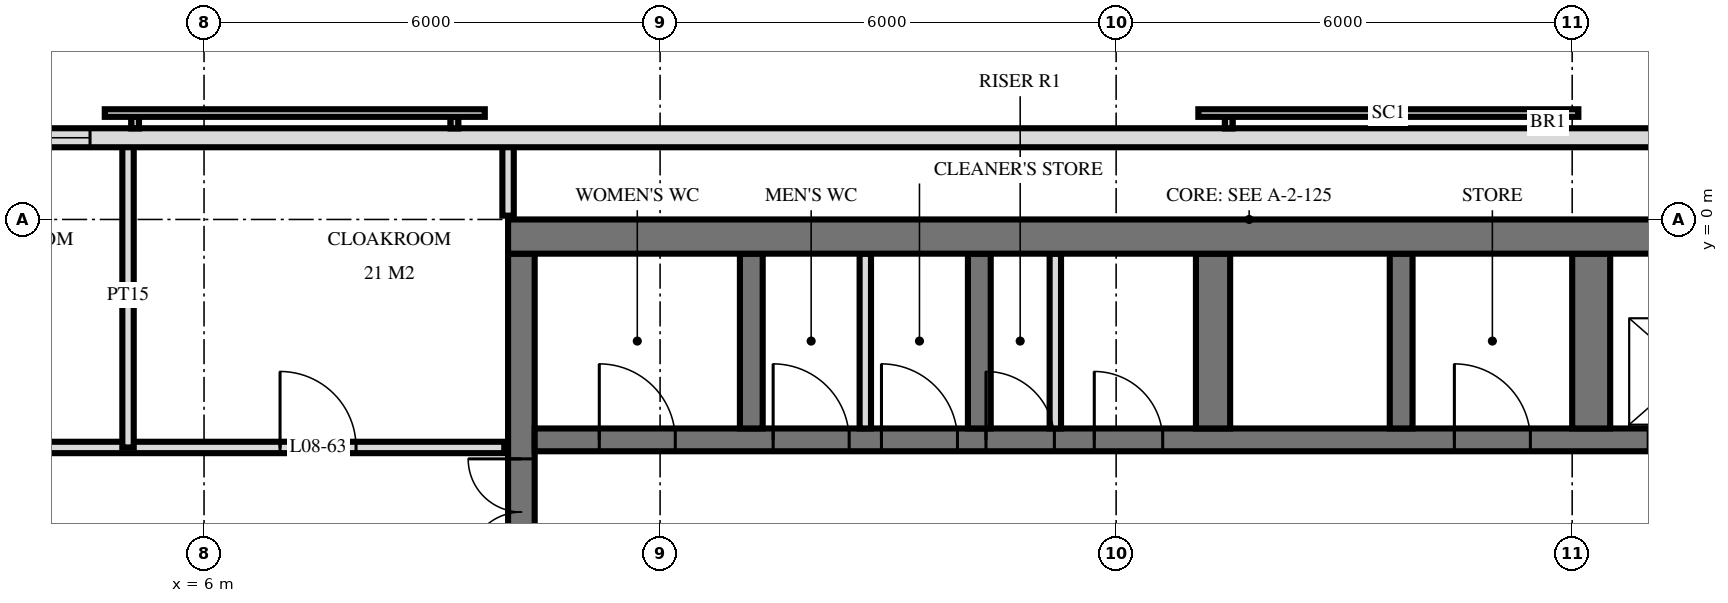
"""IFC4 building model, lengths in metres.
Left out: names, types, materials, properties, quantities, classifications, styles, units other than length and angle.
Written with IfcOpenShell. Run it as: python <this file> out.ifc"""

import sys

from ifc_helpers import new_model, si_unit, direction, frame, frame_2d, origin, place, context, subcontext, project, spatial, rectangle, extrude, element, fill, save


model = new_model("IFC4")
c1 = context("Model", 3, precision=1e-05, world=origin(), true_north=direction((0.0, 1.0)))
c2 = subcontext(c1, "Body", "Model", "MODEL_VIEW")
j1 = project(units=[si_unit("LENGTHUNIT", "METRE"), si_unit("PLANEANGLEUNIT", "RADIAN")], contexts=[c1])
p1 = place(None, origin())
s1 = spatial("IfcSite", under=j1, at=p1, CompositionType="ELEMENT")
p2 = place(p1, origin())
s2 = spatial("IfcBuilding", under=s1, at=p2, CompositionType="ELEMENT")
p3 = place(p2, frame((0.0, 0.0, 38.4)))
s3 = spatial("IfcBuildingStorey", under=s2, at=p3, CompositionType="ELEMENT", Elevation=38.4)
p4 = place(p3, frame((10.0, -0.225, 0.0), z_axis=(0.0, 0.0, 1.0), x_axis=(1.0, 0.0, 0.0)))
e1 = element("IfcWall", 1, at=p4, inside=s3, PredefinedType="SHEAR", context=c2, shape_type="SweptSolid", body=[
    extrude(rectangle(XDim=19.5, YDim=0.45, at=frame_2d((9.75, 0.0))), origin(), (0.0, 0.0, 1.0), 3.6),
])
p5 = place(p3, frame((10.175, -14.55, 0.0), z_axis=(0.0, 0.0, 1.0), x_axis=(0.0, 1.0, 0.0)))
e2 = element("IfcWall", 2, at=p5, inside=s3, PredefinedType="SHEAR", context=c2, shape_type="SweptSolid", body=[
    extrude(rectangle(XDim=14.1, YDim=0.35, at=frame_2d((7.05, 0.0))), origin(), (0.0, 0.0, 1.0), 3.6),
])
p6 = place(p5, frame((8.4, 0.0, 0.0)))
e3 = element("IfcOpeningElement", 3, at=p6, cuts=e2, PredefinedType="OPENING", context=c2, shape_type="SweptSolid", body=[
    extrude(rectangle(XDim=1.4, YDim=2.4, at=frame_2d((0.7, 1.2))), frame((0.0, 0.185, 0.0), z_axis=(0.0, -1.0, 0.0), x_axis=(1.0, 0.0, 0.0)), (0.0, 0.0, 1.0), 0.37),
])
p7 = place(p5, frame((10.0, 0.0, 0.0)))
e4 = element("IfcOpeningElement", 4, at=p7, cuts=e2, PredefinedType="OPENING", context=c2, shape_type="SweptSolid", body=[
    extrude(rectangle(XDim=1.4, YDim=2.4, at=frame_2d((0.7, 1.2))), frame((0.0, 0.185, 0.0), z_axis=(0.0, -1.0, 0.0), x_axis=(1.0, 0.0, 0.0)), (0.0, 0.0, 1.0), 0.37),
])
p8 = place(p5, frame((4.0, 0.0, 0.0)))
e5 = element("IfcOpeningElement", 5, at=p8, cuts=e2, PredefinedType="OPENING", context=c2, shape_type="SweptSolid", body=[
    extrude(rectangle(XDim=1.2, YDim=2.1, at=frame_2d((0.6, 1.05))), frame((0.0, 0.185, 0.0), z_axis=(0.0, -1.0, 0.0), x_axis=(1.0, 0.0, 0.0)), (0.0, 0.0, 1.0), 0.37),
])
p9 = place(p3, frame((10.35, -2.9, 0.0), z_axis=(0.0, 0.0, 1.0), x_axis=(1.0, 0.0, 0.0)))
e6 = element("IfcWall", 6, at=p9, inside=s3, PredefinedType="SHEAR", context=c2, shape_type="SweptSolid", body=[
    extrude(rectangle(XDim=18.7, YDim=0.3, at=frame_2d((9.35, 0.0))), origin(), (0.0, 0.0, 1.0), 3.6),
])
p10 = place(p9, frame((14.65, 0.0, 0.0)))
e7 = element("IfcOpeningElement", 7, at=p10, cuts=e6, PredefinedType="OPENING", context=c2, shape_type="SweptSolid", body=[
    extrude(rectangle(XDim=1.1, YDim=2.1, at=frame_2d((0.55, 1.05))), frame((0.0, 0.16, 0.0), z_axis=(0.0, -1.0, 0.0), x_axis=(1.0, 0.0, 0.0)), (0.0, 0.0, 1.0), 0.32),
])
p11 = place(p9, frame((17.05, 0.0, 0.0)))
e8 = element("IfcOpeningElement", 8, at=p11, cuts=e6, PredefinedType="OPENING", context=c2, shape_type="SweptSolid", body=[
    extrude(rectangle(XDim=1.1, YDim=2.1, at=frame_2d((0.55, 1.05))), frame((0.0, 0.16, 0.0), z_axis=(0.0, -1.0, 0.0), x_axis=(1.0, 0.0, 0.0)), (0.0, 0.0, 1.0), 0.32),
])
p12 = place(p9, frame((5.938, 0.0, 0.0)))
e9 = element("IfcOpeningElement", 9, at=p12, cuts=e6, PredefinedType="OPENING", context=c2, shape_type="SweptSolid", body=[
    extrude(rectangle(XDim=0.9, YDim=2.1, at=frame_2d((0.45, 1.05))), frame((0.0, 0.16, 0.0), z_axis=(0.0, -1.0, 0.0), x_axis=(1.0, 0.0, 0.0)), (0.0, 0.0, 1.0), 0.32),
])
p13 = place(p9, frame((7.363, 0.0, 0.0)))
e10 = element("IfcOpeningElement", 10, at=p13, cuts=e6, PredefinedType="OPENING", context=c2, shape_type="SweptSolid", body=[
    extrude(rectangle(XDim=0.9, YDim=2.1, at=frame_2d((0.45, 1.05))), frame((0.0, 0.16, 0.0), z_axis=(0.0, -1.0, 0.0), x_axis=(1.0, 0.0, 0.0)), (0.0, 0.0, 1.0), 0.32),
])
p14 = place(p9, frame((0.85, 0.0, 0.0)))
e11 = element("IfcOpeningElement", 11, at=p14, cuts=e6, PredefinedType="OPENING", context=c2, shape_type="SweptSolid", body=[
    extrude(rectangle(XDim=1.0, YDim=2.1, at=frame_2d((0.5, 1.05))), frame((0.0, 0.16, 0.0), z_axis=(0.0, -1.0, 0.0), x_axis=(1.0, 0.0, 0.0)), (0.0, 0.0, 1.0), 0.32),
])
p15 = place(p9, frame((3.137, 0.0, 0.0)))
e12 = element("IfcOpeningElement", 12, at=p15, cuts=e6, PredefinedType="OPENING", context=c2, shape_type="SweptSolid", body=[
    extrude(rectangle(XDim=1.0, YDim=2.1, at=frame_2d((0.5, 1.05))), frame((0.0, 0.16, 0.0), z_axis=(0.0, -1.0, 0.0), x_axis=(1.0, 0.0, 0.0)), (0.0, 0.0, 1.0), 0.32),
])
p16 = place(p9, frame((4.562, 0.0, 0.0)))
e13 = element("IfcOpeningElement", 13, at=p16, cuts=e6, PredefinedType="OPENING", context=c2, shape_type="SweptSolid", body=[
    extrude(rectangle(XDim=1.0, YDim=2.1, at=frame_2d((0.5, 1.05))), frame((0.0, 0.16, 0.0), z_axis=(0.0, -1.0, 0.0), x_axis=(1.0, 0.0, 0.0)), (0.0, 0.0, 1.0), 0.32),
])
p17 = place(p9, frame((12.1, 0.0, 0.0)))
e14 = element("IfcOpeningElement", 14, at=p17, cuts=e6, PredefinedType="OPENING", context=c2, shape_type="SweptSolid", body=[
    extrude(rectangle(XDim=1.0, YDim=2.1, at=frame_2d((0.5, 1.05))), frame((0.0, 0.16, 0.0), z_axis=(0.0, -1.0, 0.0), x_axis=(1.0, 0.0, 0.0)), (0.0, 0.0, 1.0), 0.32),
])
for number, where, z_axis, x_axis in (
    (15, (13.2, -2.75, 0.0), (0.0, 0.0, 1.0), (0.0, 1.0, 0.0)),
    (16, (16.2, -2.75, 0.0), (0.0, 0.0, 1.0), (0.0, 1.0, 0.0)),
):
    element("IfcWall", number, at=place(p3, frame(where, z_axis=z_axis, x_axis=x_axis)), inside=s3, PredefinedType="SHEAR", context=c2, shape_type="SweptSolid", body=[
        extrude(rectangle(XDim=2.3, YDim=0.3, at=frame_2d((1.15, 0.0))), origin(), (0.0, 0.0, 1.0), 3.6),
    ])
p18 = place(p3, frame((19.275, -2.75, 0.0), z_axis=(0.0, 0.0, 1.0), x_axis=(0.0, 1.0, 0.0)))
e17 = element("IfcWall", 17, at=p18, inside=s3, PredefinedType="SHEAR", context=c2, shape_type="SweptSolid", body=[
    extrude(rectangle(XDim=2.3, YDim=0.45, at=frame_2d((1.15, 0.0))), origin(), (0.0, 0.0, 1.0), 3.6),
])
p19 = place(p3, frame((21.75, -2.75, 0.0), z_axis=(0.0, 0.0, 1.0), x_axis=(0.0, 1.0, 0.0)))
e18 = element("IfcWall", 18, at=p19, inside=s3, PredefinedType="SHEAR", context=c2, shape_type="SweptSolid", body=[
    extrude(rectangle(XDim=2.3, YDim=0.3, at=frame_2d((1.15, 0.0))), origin(), (0.0, 0.0, 1.0), 3.6),
])
p20 = place(p3, frame((24.25, -2.75, 0.0), z_axis=(0.0, 0.0, 1.0), x_axis=(0.0, 1.0, 0.0)))
e19 = element("IfcWall", 19, at=p20, inside=s3, PredefinedType="SHEAR", context=c2, shape_type="SweptSolid", body=[
    extrude(rectangle(XDim=2.3, YDim=0.5, at=frame_2d((1.15, 0.0))), origin(), (0.0, 0.0, 1.0), 3.6),
])
p21 = place(p3, frame((28.775, 1.075, 0.0), z_axis=(0.0, 0.0, 1.0), x_axis=(-1.0, 0.0, 0.0)))
e20 = element("IfcWall", 20, at=p21, inside=s3, PredefinedType="SOLIDWALL", context=c2, shape_type="SweptSolid", body=[
    extrude(rectangle(XDim=57.551, YDim=0.25, at=frame_2d((28.775, 0.0))), origin(), (0.0, 0.0, 1.0), 3.32),
])
p22 = place(p21, frame((24.275, 0.0, 0.3)))
e21 = element("IfcOpeningElement", 21, at=p22, cuts=e20, PredefinedType="OPENING", context=c2, shape_type="SweptSolid", body=[
    extrude(rectangle(XDim=2.4, YDim=2.1, at=frame_2d((1.2, 1.05))), frame((0.0, 0.135, 0.0), z_axis=(0.0, -1.0, 0.0), x_axis=(1.0, 0.0, 0.0)), (0.0, 0.0, 1.0), 0.27),
])
p23 = place(p21, frame((35.325, 0.0, 0.3)))
e22 = element("IfcOpeningElement", 22, at=p23, cuts=e20, PredefinedType="OPENING", context=c2, shape_type="SweptSolid", body=[
    extrude(rectangle(XDim=2.4, YDim=2.1, at=frame_2d((1.2, 1.05))), frame((0.0, 0.135, 0.0), z_axis=(0.0, -1.0, 0.0), x_axis=(1.0, 0.0, 0.0)), (0.0, 0.0, 1.0), 0.27),
])
for number, where, z_axis, x_axis in (
    (23, (17.2, -2.75, 0.0), (0.0, 0.0, 1.0), (0.0, 1.0, 0.0)),
    (24, (14.7, -2.75, 0.0), (0.0, 0.0, 1.0), (0.0, 1.0, 0.0)),
):
    element("IfcWall", number, at=place(p3, frame(where, z_axis=z_axis, x_axis=x_axis)), inside=s3, PredefinedType="PARTITIONING", context=c2, shape_type="SweptSolid", body=[
        extrude(rectangle(XDim=2.3, YDim=0.15, at=frame_2d((1.15, 0.0))), origin(), (0.0, 0.0, 1.0), 3.3),
    ])
p24 = place(p3, frame((10.0, 0.05, 0.0), z_axis=(0.0, 0.0, 1.0), x_axis=(0.0, 1.0, 0.0)))
e25 = element("IfcWall", 25, at=p24, inside=s3, PredefinedType="PARTITIONING", context=c2, shape_type="SweptSolid", body=[
    extrude(rectangle(XDim=0.97, YDim=0.15, at=frame_2d((0.485, 0.0))), origin(), (0.0, 0.0, 1.0), 3.32),
])
p25 = place(p3, frame((5.0, -3.0, 0.0), z_axis=(0.0, 0.0, 1.0), x_axis=(0.0, 1.0, 0.0)))
e26 = element("IfcWall", 26, at=p25, inside=s3, PredefinedType="PARTITIONING", context=c2, shape_type="SweptSolid", body=[
    extrude(rectangle(XDim=4.02, YDim=0.15, at=frame_2d((2.01, 0.0))), origin(), (0.0, 0.0, 1.0), 3.32),
])
p26 = place(p3, frame((-9.95, -3.0, 0.0), z_axis=(0.0, 0.0, 1.0), x_axis=(1.0, 0.0, 0.0)))
e27 = element("IfcWall", 27, at=p26, inside=s3, PredefinedType="PARTITIONING", context=c2, shape_type="SweptSolid", body=[
    extrude(rectangle(XDim=19.9, YDim=0.15, at=frame_2d((9.95, 0.0))), origin(), (0.0, 0.0, 1.0), 3.32),
])
p27 = place(p26, frame((1.7, 0.0, 0.0)))
e28 = element("IfcOpeningElement", 28, at=p27, cuts=e27, PredefinedType="OPENING", context=c2, shape_type="SweptSolid", body=[
    extrude(rectangle(XDim=1.0, YDim=2.1, at=frame_2d((0.5, 1.05))), frame((0.0, 0.085, 0.0), z_axis=(0.0, -1.0, 0.0), x_axis=(1.0, 0.0, 0.0)), (0.0, 0.0, 1.0), 0.17),
])
p28 = place(p26, frame((5.45, 0.0, 0.0)))
e29 = element("IfcOpeningElement", 29, at=p28, cuts=e27, PredefinedType="OPENING", context=c2, shape_type="SweptSolid", body=[
    extrude(rectangle(XDim=1.0, YDim=2.1, at=frame_2d((0.5, 1.05))), frame((0.0, 0.085, 0.0), z_axis=(0.0, -1.0, 0.0), x_axis=(1.0, 0.0, 0.0)), (0.0, 0.0, 1.0), 0.17),
])
p29 = place(p26, frame((8.2, 0.0, 0.0)))
e30 = element("IfcOpeningElement", 30, at=p29, cuts=e27, PredefinedType="OPENING", context=c2, shape_type="SweptSolid", body=[
    extrude(rectangle(XDim=1.0, YDim=2.1, at=frame_2d((0.5, 1.05))), frame((0.0, 0.085, 0.0), z_axis=(0.0, -1.0, 0.0), x_axis=(1.0, 0.0, 0.0)), (0.0, 0.0, 1.0), 0.17),
])
p30 = place(p26, frame((11.95, 0.0, 0.0)))
e31 = element("IfcOpeningElement", 31, at=p30, cuts=e27, PredefinedType="OPENING", context=c2, shape_type="SweptSolid", body=[
    extrude(rectangle(XDim=1.0, YDim=2.1, at=frame_2d((0.5, 1.05))), frame((0.0, 0.085, 0.0), z_axis=(0.0, -1.0, 0.0), x_axis=(1.0, 0.0, 0.0)), (0.0, 0.0, 1.0), 0.17),
])
p31 = place(p26, frame((16.95, 0.0, 0.0)))
e32 = element("IfcOpeningElement", 32, at=p31, cuts=e27, PredefinedType="OPENING", context=c2, shape_type="SweptSolid", body=[
    extrude(rectangle(XDim=1.0, YDim=2.1, at=frame_2d((0.5, 1.05))), frame((0.0, 0.085, 0.0), z_axis=(0.0, -1.0, 0.0), x_axis=(1.0, 0.0, 0.0)), (0.0, 0.0, 1.0), 0.17),
])
p32 = place(p22, origin())
e33 = element("IfcWindow", 33, at=p32, inside=s3, PartitioningType="SINGLE_PANEL", PredefinedType="WINDOW", context=c2, shape_type="SweptSolid", body=[
    extrude(rectangle(XDim=2.4, YDim=2.1, at=frame_2d((1.2, 1.05))), frame((0.0, 0.03, 0.0), z_axis=(0.0, -1.0, 0.0), x_axis=(1.0, 0.0, 0.0)), (0.0, 0.0, 1.0), 0.06),
])
fill(e21, e33)
p33 = place(p7, origin())
e34 = element("IfcDoor", 34, at=p33, inside=s3, OperationType="DOUBLE_DOOR_SINGLE_SWING", PredefinedType="DOOR", context=c2, shape_type="SweptSolid", body=[
    extrude(rectangle(XDim=1.4, YDim=2.4, at=frame_2d((0.7, 1.2))), frame((0.0, 0.025, 0.0), z_axis=(0.0, -1.0, 0.0), x_axis=(1.0, 0.0, 0.0)), (0.0, 0.0, 1.0), 0.05),
])
fill(e4, e34)
p34 = place(p12, origin())
e35 = element("IfcDoor", 35, at=p34, inside=s3, OperationType="SINGLE_SWING_RIGHT", PredefinedType="DOOR", context=c2, shape_type="SweptSolid", body=[
    extrude(rectangle(XDim=0.9, YDim=2.1, at=frame_2d((0.45, 1.05))), frame((0.0, 0.025, 0.0), z_axis=(0.0, -1.0, 0.0), x_axis=(1.0, 0.0, 0.0)), (0.0, 0.0, 1.0), 0.05),
])
fill(e9, e35)
p35 = place(p13, origin())
e36 = element("IfcDoor", 36, at=p35, inside=s3, OperationType="SINGLE_SWING_RIGHT", PredefinedType="DOOR", context=c2, shape_type="SweptSolid", body=[
    extrude(rectangle(XDim=0.9, YDim=2.1, at=frame_2d((0.45, 1.05))), frame((0.0, 0.025, 0.0), z_axis=(0.0, -1.0, 0.0), x_axis=(1.0, 0.0, 0.0)), (0.0, 0.0, 1.0), 0.05),
])
fill(e10, e36)
p36 = place(p14, origin())
e37 = element("IfcDoor", 37, at=p36, inside=s3, OperationType="SINGLE_SWING_RIGHT", PredefinedType="DOOR", context=c2, shape_type="SweptSolid", body=[
    extrude(rectangle(XDim=1.0, YDim=2.1, at=frame_2d((0.5, 1.05))), frame((0.0, 0.025, 0.0), z_axis=(0.0, -1.0, 0.0), x_axis=(1.0, 0.0, 0.0)), (0.0, 0.0, 1.0), 0.05),
])
fill(e11, e37)
p37 = place(p15, origin())
e38 = element("IfcDoor", 38, at=p37, inside=s3, OperationType="SINGLE_SWING_RIGHT", PredefinedType="DOOR", context=c2, shape_type="SweptSolid", body=[
    extrude(rectangle(XDim=1.0, YDim=2.1, at=frame_2d((0.5, 1.05))), frame((0.0, 0.025, 0.0), z_axis=(0.0, -1.0, 0.0), x_axis=(1.0, 0.0, 0.0)), (0.0, 0.0, 1.0), 0.05),
])
fill(e12, e38)
p38 = place(p16, origin())
e39 = element("IfcDoor", 39, at=p38, inside=s3, OperationType="SINGLE_SWING_RIGHT", PredefinedType="DOOR", context=c2, shape_type="SweptSolid", body=[
    extrude(rectangle(XDim=1.0, YDim=2.1, at=frame_2d((0.5, 1.05))), frame((0.0, 0.025, 0.0), z_axis=(0.0, -1.0, 0.0), x_axis=(1.0, 0.0, 0.0)), (0.0, 0.0, 1.0), 0.05),
])
fill(e13, e39)
p39 = place(p17, origin())
e40 = element("IfcDoor", 40, at=p39, inside=s3, OperationType="SINGLE_SWING_RIGHT", PredefinedType="DOOR", context=c2, shape_type="SweptSolid", body=[
    extrude(rectangle(XDim=1.0, YDim=2.1, at=frame_2d((0.5, 1.05))), frame((0.0, 0.025, 0.0), z_axis=(0.0, -1.0, 0.0), x_axis=(1.0, 0.0, 0.0)), (0.0, 0.0, 1.0), 0.05),
])
fill(e14, e40)
p40 = place(p31, origin())
e41 = element("IfcDoor", 41, at=p40, inside=s3, OperationType="SINGLE_SWING_RIGHT", PredefinedType="DOOR", context=c2, shape_type="SweptSolid", body=[
    extrude(rectangle(XDim=1.0, YDim=2.1, at=frame_2d((0.5, 1.05))), frame((0.0, 0.025, 0.0), z_axis=(0.0, -1.0, 0.0), x_axis=(1.0, 0.0, 0.0)), (0.0, 0.0, 1.0), 0.05),
])
fill(e32, e41)
save(model, sys.argv[1])
